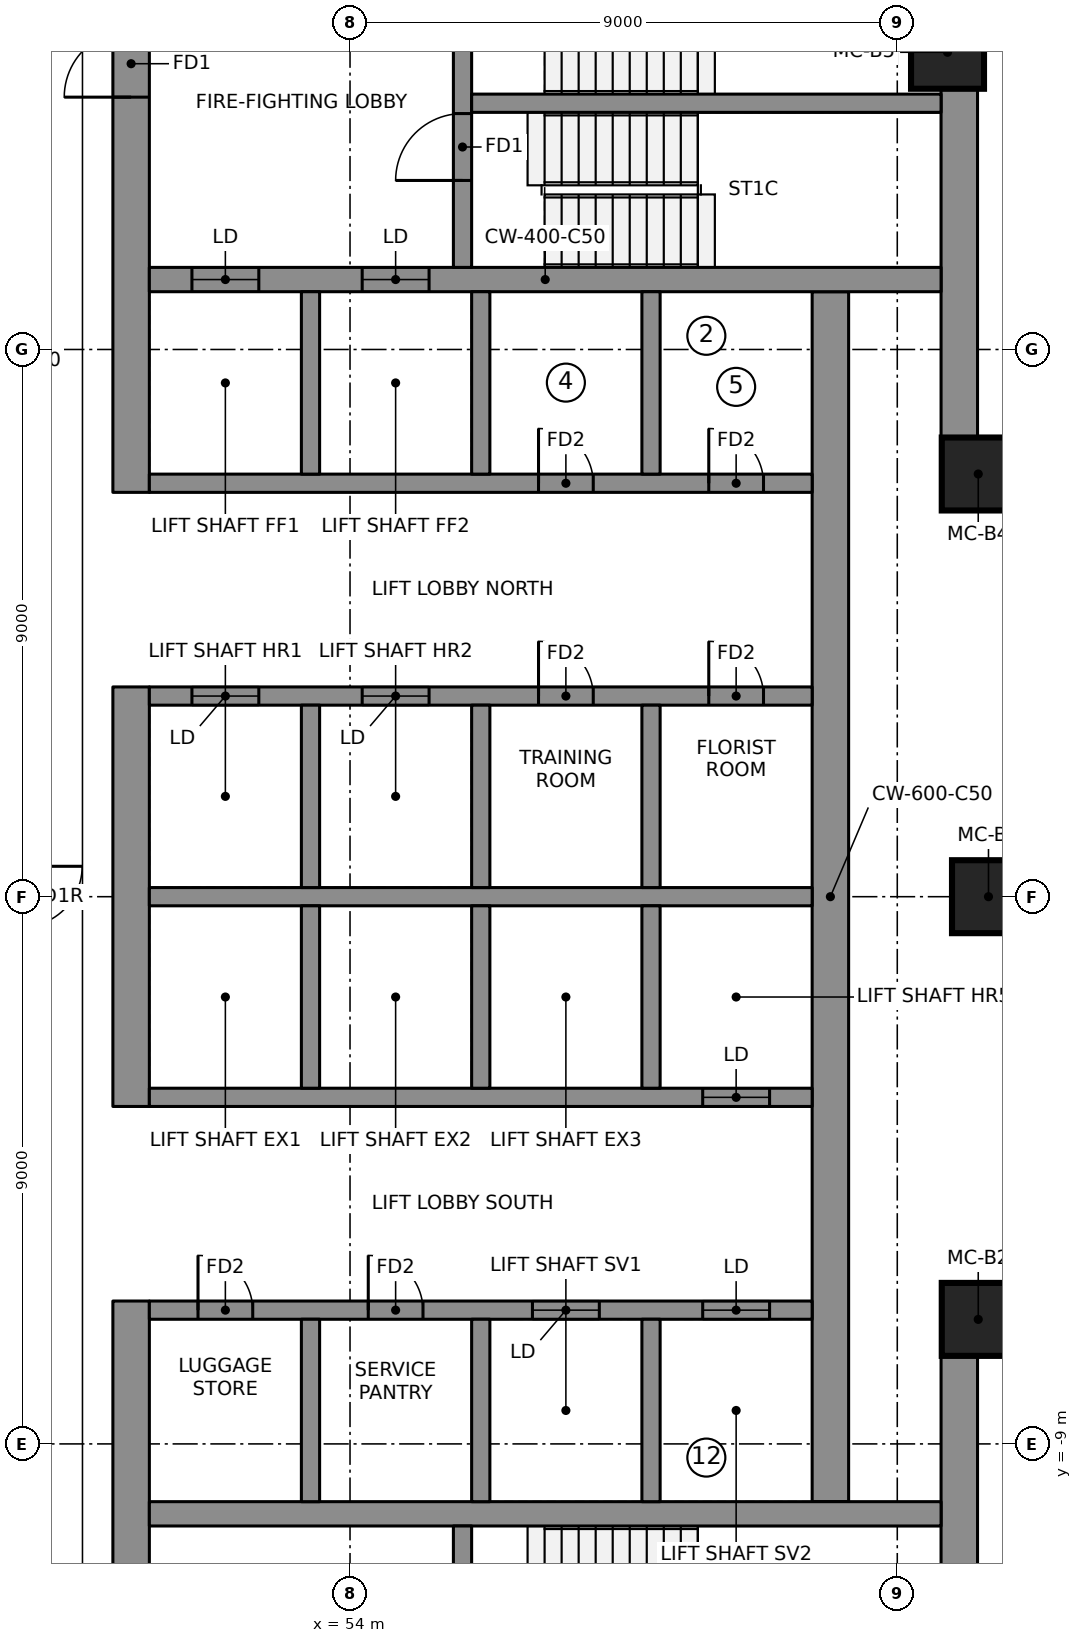
"""IFC4 building model, lengths in metres.
Left out: names, types, materials, properties, quantities, classifications, styles, units other than length and angle.
Written with IfcOpenShell. Run it as: python <this file> out.ifc"""

import sys

from ifc_helpers import new_model, si_unit, direction, frame, frame_2d, origin, origin_2d, place, context, subcontext, project, spatial, rectangle, extrude, element, fill, save


model = new_model("IFC4")
c1 = context("Model", 3, precision=1e-05, world=origin(), true_north=direction((0.0, 1.0)))
c2 = subcontext(c1, "Body", "Model", "MODEL_VIEW")
j1 = project(units=[si_unit("LENGTHUNIT", "METRE"), si_unit("PLANEANGLEUNIT", "RADIAN")], contexts=[c1])
p1 = place(None, origin())
s1 = spatial("IfcSite", under=j1, at=p1, CompositionType="ELEMENT")
p2 = place(p1, origin())
s2 = spatial("IfcBuilding", under=s1, at=p2, CompositionType="ELEMENT")
p3 = place(p2, frame((0.0, 0.0, 238.55)))
s3 = spatial("IfcBuildingStorey", under=s2, at=p3, CompositionType="ELEMENT", Elevation=238.55)
p4 = place(p3, frame((50.4, 6.65, 0.0), z_axis=(0.0, 0.0, 1.0), x_axis=(0.0, 1.0, 0.0)))
e1 = element("IfcWall", 1, at=p4, inside=s3, PredefinedType="SHEAR", context=c2, shape_type="SweptSolid", body=[
    extrude(rectangle(XDim=9.7, YDim=0.6, at=frame_2d((4.85, 0.0))), origin(), (0.0, 0.0, 1.0), 3.55),
])
p5 = place(p4, frame((6.5, 0.0, 0.0)))
e2 = element("IfcOpeningElement", 2, at=p5, cuts=e1, PredefinedType="OPENING", context=c2, shape_type="SweptSolid", body=[
    extrude(rectangle(XDim=1.1, YDim=2.1, at=frame_2d((0.55, 1.05))), frame((0.0, 0.31, 0.0), z_axis=(0.0, -1.0, 0.0), x_axis=(1.0, 0.0, 0.0)), (0.0, 0.0, 1.0), 0.62),
])
p6 = place(p3, frame((50.4, -3.45, 0.0), z_axis=(0.0, 0.0, 1.0), x_axis=(0.0, 1.0, 0.0)))
e3 = element("IfcWall", 3, at=p6, inside=s3, PredefinedType="SHEAR", context=c2, shape_type="SweptSolid", body=[
    extrude(rectangle(XDim=6.9, YDim=0.6, at=frame_2d((3.45, 0.0))), origin(), (0.0, 0.0, 1.0), 3.55),
])
p7 = place(p3, frame((50.4, -16.35, 0.0), z_axis=(0.0, 0.0, 1.0), x_axis=(0.0, 1.0, 0.0)))
e4 = element("IfcWall", 4, at=p7, inside=s3, PredefinedType="SHEAR", context=c2, shape_type="SweptSolid", body=[
    extrude(rectangle(XDim=9.7, YDim=0.6, at=frame_2d((4.85, 0.0))), origin(), (0.0, 0.0, 1.0), 3.55),
])
p8 = place(p7, frame((2.1, 0.0, 0.0)))
e5 = element("IfcOpeningElement", 5, at=p8, cuts=e4, PredefinedType="OPENING", context=c2, shape_type="SweptSolid", body=[
    extrude(rectangle(XDim=1.1, YDim=2.1, at=frame_2d((0.55, 1.05))), frame((0.0, 0.31, 0.0), z_axis=(0.0, -1.0, 0.0), x_axis=(1.0, 0.0, 0.0)), (0.0, 0.0, 1.0), 0.62),
])
for number, where, z_axis, x_axis in (
    (6, (64.02, 7.502, 0.0), (0.0, 0.0, 1.0), (0.0, 1.0, 0.0)),
    (7, (64.02, -15.75, 0.0), (0.0, 0.0, 1.0), (0.0, 1.0, 0.0)),
):
    element("IfcWall", number, at=place(p3, frame(where, z_axis=z_axis, x_axis=x_axis)), inside=s3, PredefinedType="SHEAR", context=c2, shape_type="SweptSolid", body=[
        extrude(rectangle(XDim=8.248, YDim=0.6, at=frame_2d((4.124, 0.0))), origin(), (0.0, 0.0, 1.0), 3.55),
    ])
p9 = place(p3, frame((61.9, -9.95, 0.0), z_axis=(0.0, 0.0, 1.0), x_axis=(0.0, 1.0, 0.0)))
e8 = element("IfcWall", 8, at=p9, inside=s3, PredefinedType="SHEAR", context=c2, shape_type="SweptSolid", body=[
    extrude(rectangle(XDim=19.9, YDim=0.6, at=frame_2d((9.95, 0.0))), origin(), (0.0, 0.0, 1.0), 3.55),
])
p10 = place(p3, frame((50.7, 10.15, 0.0), z_axis=(0.0, 0.0, 1.0), x_axis=(1.0, 0.0, 0.0)))
e9 = element("IfcWall", 9, at=p10, inside=s3, PredefinedType="SHEAR", context=c2, shape_type="SweptSolid", body=[
    extrude(rectangle(XDim=13.02, YDim=0.4, at=frame_2d((6.51, 0.0))), origin(), (0.0, 0.0, 1.0), 3.55),
])
p11 = place(p10, frame((0.7, 0.0, 0.0)))
e10 = element("IfcOpeningElement", 10, at=p11, cuts=e9, PredefinedType="OPENING", context=c2, shape_type="SweptSolid", body=[
    extrude(rectangle(XDim=1.1, YDim=2.1, at=frame_2d((0.55, 1.05))), frame((0.0, 0.21, 0.0), z_axis=(0.0, -1.0, 0.0), x_axis=(1.0, 0.0, 0.0)), (0.0, 0.0, 1.0), 0.42),
])
p12 = place(p10, frame((3.5, 0.0, 0.0)))
e11 = element("IfcOpeningElement", 11, at=p12, cuts=e9, PredefinedType="OPENING", context=c2, shape_type="SweptSolid", body=[
    extrude(rectangle(XDim=1.1, YDim=2.1, at=frame_2d((0.55, 1.05))), frame((0.0, 0.21, 0.0), z_axis=(0.0, -1.0, 0.0), x_axis=(1.0, 0.0, 0.0)), (0.0, 0.0, 1.0), 0.42),
])
p13 = place(p3, frame((50.7, -10.15, 0.0), z_axis=(0.0, 0.0, 1.0), x_axis=(1.0, 0.0, 0.0)))
e12 = element("IfcWall", 12, at=p13, inside=s3, PredefinedType="SHEAR", context=c2, shape_type="SweptSolid", body=[
    extrude(rectangle(XDim=13.02, YDim=0.4, at=frame_2d((6.51, 0.0))), origin(), (0.0, 0.0, 1.0), 3.55),
])
p14 = place(p3, frame((50.7, 0.0, 0.0), z_axis=(0.0, 0.0, 1.0), x_axis=(1.0, 0.0, 0.0)))
e13 = element("IfcWall", 13, at=p14, inside=s3, PredefinedType="SHEAR", context=c2, shape_type="SweptSolid", body=[
    extrude(rectangle(XDim=10.9, YDim=0.3, at=frame_2d((5.45, 0.0))), origin(), (0.0, 0.0, 1.0), 3.55),
])
p15 = place(p3, frame((50.7, 3.3, 0.0), z_axis=(0.0, 0.0, 1.0), x_axis=(1.0, 0.0, 0.0)))
e14 = element("IfcWall", 14, at=p15, inside=s3, PredefinedType="SHEAR", context=c2, shape_type="SweptSolid", body=[
    extrude(rectangle(XDim=10.9, YDim=0.3, at=frame_2d((5.45, 0.0))), origin(), (0.0, 0.0, 1.0), 3.55),
])
p16 = place(p15, frame((0.7, 0.0, 0.0)))
e15 = element("IfcOpeningElement", 15, at=p16, cuts=e14, PredefinedType="OPENING", context=c2, shape_type="SweptSolid", body=[
    extrude(rectangle(XDim=1.1, YDim=2.1, at=frame_2d((0.55, 1.05))), frame((0.0, 0.16, 0.0), z_axis=(0.0, -1.0, 0.0), x_axis=(1.0, 0.0, 0.0)), (0.0, 0.0, 1.0), 0.32),
])
p17 = place(p15, frame((3.5, 0.0, 0.0)))
e16 = element("IfcOpeningElement", 16, at=p17, cuts=e14, PredefinedType="OPENING", context=c2, shape_type="SweptSolid", body=[
    extrude(rectangle(XDim=1.1, YDim=2.1, at=frame_2d((0.55, 1.05))), frame((0.0, 0.16, 0.0), z_axis=(0.0, -1.0, 0.0), x_axis=(1.0, 0.0, 0.0)), (0.0, 0.0, 1.0), 0.32),
])
p18 = place(p15, frame((6.4, 0.0, 0.0)))
e17 = element("IfcOpeningElement", 17, at=p18, cuts=e14, PredefinedType="OPENING", context=c2, shape_type="SweptSolid", body=[
    extrude(rectangle(XDim=0.9, YDim=2.1, at=frame_2d((0.45, 1.05))), frame((0.0, 0.16, 0.0), z_axis=(0.0, -1.0, 0.0), x_axis=(1.0, 0.0, 0.0)), (0.0, 0.0, 1.0), 0.32),
])
p19 = place(p15, frame((9.2, 0.0, 0.0)))
e18 = element("IfcOpeningElement", 18, at=p19, cuts=e14, PredefinedType="OPENING", context=c2, shape_type="SweptSolid", body=[
    extrude(rectangle(XDim=0.9, YDim=2.1, at=frame_2d((0.45, 1.05))), frame((0.0, 0.16, 0.0), z_axis=(0.0, -1.0, 0.0), x_axis=(1.0, 0.0, 0.0)), (0.0, 0.0, 1.0), 0.32),
])
p20 = place(p3, frame((50.7, 6.8, 0.0), z_axis=(0.0, 0.0, 1.0), x_axis=(1.0, 0.0, 0.0)))
e19 = element("IfcWall", 19, at=p20, inside=s3, PredefinedType="SHEAR", context=c2, shape_type="SweptSolid", body=[
    extrude(rectangle(XDim=10.9, YDim=0.3, at=frame_2d((5.45, 0.0))), origin(), (0.0, 0.0, 1.0), 3.55),
])
p21 = place(p20, frame((6.4, 0.0, 0.0)))
e20 = element("IfcOpeningElement", 20, at=p21, cuts=e19, PredefinedType="OPENING", context=c2, shape_type="SweptSolid", body=[
    extrude(rectangle(XDim=0.9, YDim=2.1, at=frame_2d((0.45, 1.05))), frame((0.0, 0.16, 0.0), z_axis=(0.0, -1.0, 0.0), x_axis=(1.0, 0.0, 0.0)), (0.0, 0.0, 1.0), 0.32),
])
p22 = place(p20, frame((9.2, 0.0, 0.0)))
e21 = element("IfcOpeningElement", 21, at=p22, cuts=e19, PredefinedType="OPENING", context=c2, shape_type="SweptSolid", body=[
    extrude(rectangle(XDim=0.9, YDim=2.1, at=frame_2d((0.45, 1.05))), frame((0.0, 0.16, 0.0), z_axis=(0.0, -1.0, 0.0), x_axis=(1.0, 0.0, 0.0)), (0.0, 0.0, 1.0), 0.32),
])
for number, where, z_axis, x_axis in (
    (22, (53.35, 0.15, 0.0), (0.0, 0.0, 1.0), (0.0, 1.0, 0.0)),
    (23, (53.35, 6.95, 0.0), (0.0, 0.0, 1.0), (0.0, 1.0, 0.0)),
    (24, (56.15, 0.15, 0.0), (0.0, 0.0, 1.0), (0.0, 1.0, 0.0)),
    (25, (56.15, 6.95, 0.0), (0.0, 0.0, 1.0), (0.0, 1.0, 0.0)),
    (26, (58.95, 0.15, 0.0), (0.0, 0.0, 1.0), (0.0, 1.0, 0.0)),
    (27, (58.95, 6.95, 0.0), (0.0, 0.0, 1.0), (0.0, 1.0, 0.0)),
):
    element("IfcWall", number, at=place(p3, frame(where, z_axis=z_axis, x_axis=x_axis)), inside=s3, PredefinedType="SHEAR", context=c2, shape_type="SweptSolid", body=[
        extrude(rectangle(XDim=3.0, YDim=0.3, at=frame_2d((1.5, 0.0))), origin(), (0.0, 0.0, 1.0), 3.55),
    ])
p23 = place(p3, frame((50.7, -3.3, 0.0), z_axis=(0.0, 0.0, 1.0), x_axis=(1.0, 0.0, 0.0)))
e28 = element("IfcWall", 28, at=p23, inside=s3, PredefinedType="SHEAR", context=c2, shape_type="SweptSolid", body=[
    extrude(rectangle(XDim=10.9, YDim=0.3, at=frame_2d((5.45, 0.0))), origin(), (0.0, 0.0, 1.0), 3.55),
])
p24 = place(p23, frame((9.1, 0.0, 0.0)))
e29 = element("IfcOpeningElement", 29, at=p24, cuts=e28, PredefinedType="OPENING", context=c2, shape_type="SweptSolid", body=[
    extrude(rectangle(XDim=1.1, YDim=2.1, at=frame_2d((0.55, 1.05))), frame((0.0, 0.16, 0.0), z_axis=(0.0, -1.0, 0.0), x_axis=(1.0, 0.0, 0.0)), (0.0, 0.0, 1.0), 0.32),
])
p25 = place(p3, frame((50.7, -6.8, 0.0), z_axis=(0.0, 0.0, 1.0), x_axis=(1.0, 0.0, 0.0)))
e30 = element("IfcWall", 30, at=p25, inside=s3, PredefinedType="SHEAR", context=c2, shape_type="SweptSolid", body=[
    extrude(rectangle(XDim=10.9, YDim=0.3, at=frame_2d((5.45, 0.0))), origin(), (0.0, 0.0, 1.0), 3.55),
])
p26 = place(p25, frame((6.3, 0.0, 0.0)))
e31 = element("IfcOpeningElement", 31, at=p26, cuts=e30, PredefinedType="OPENING", context=c2, shape_type="SweptSolid", body=[
    extrude(rectangle(XDim=1.1, YDim=2.1, at=frame_2d((0.55, 1.05))), frame((0.0, 0.16, 0.0), z_axis=(0.0, -1.0, 0.0), x_axis=(1.0, 0.0, 0.0)), (0.0, 0.0, 1.0), 0.32),
])
p27 = place(p25, frame((9.1, 0.0, 0.0)))
e32 = element("IfcOpeningElement", 32, at=p27, cuts=e30, PredefinedType="OPENING", context=c2, shape_type="SweptSolid", body=[
    extrude(rectangle(XDim=1.1, YDim=2.1, at=frame_2d((0.55, 1.05))), frame((0.0, 0.16, 0.0), z_axis=(0.0, -1.0, 0.0), x_axis=(1.0, 0.0, 0.0)), (0.0, 0.0, 1.0), 0.32),
])
p28 = place(p25, frame((0.8, 0.0, 0.0)))
e33 = element("IfcOpeningElement", 33, at=p28, cuts=e30, PredefinedType="OPENING", context=c2, shape_type="SweptSolid", body=[
    extrude(rectangle(XDim=0.9, YDim=2.1, at=frame_2d((0.45, 1.05))), frame((0.0, 0.16, 0.0), z_axis=(0.0, -1.0, 0.0), x_axis=(1.0, 0.0, 0.0)), (0.0, 0.0, 1.0), 0.32),
])
p29 = place(p25, frame((3.6, 0.0, 0.0)))
e34 = element("IfcOpeningElement", 34, at=p29, cuts=e30, PredefinedType="OPENING", context=c2, shape_type="SweptSolid", body=[
    extrude(rectangle(XDim=0.9, YDim=2.1, at=frame_2d((0.45, 1.05))), frame((0.0, 0.16, 0.0), z_axis=(0.0, -1.0, 0.0), x_axis=(1.0, 0.0, 0.0)), (0.0, 0.0, 1.0), 0.32),
])
for number, where, z_axis, x_axis in (
    (35, (53.35, -3.15, 0.0), (0.0, 0.0, 1.0), (0.0, 1.0, 0.0)),
    (36, (53.35, -9.95, 0.0), (0.0, 0.0, 1.0), (0.0, 1.0, 0.0)),
    (37, (56.15, -3.15, 0.0), (0.0, 0.0, 1.0), (0.0, 1.0, 0.0)),
    (38, (56.15, -9.95, 0.0), (0.0, 0.0, 1.0), (0.0, 1.0, 0.0)),
    (39, (58.95, -3.15, 0.0), (0.0, 0.0, 1.0), (0.0, 1.0, 0.0)),
    (40, (58.95, -9.95, 0.0), (0.0, 0.0, 1.0), (0.0, 1.0, 0.0)),
):
    element("IfcWall", number, at=place(p3, frame(where, z_axis=z_axis, x_axis=x_axis)), inside=s3, PredefinedType="SHEAR", context=c2, shape_type="SweptSolid", body=[
        extrude(rectangle(XDim=3.0, YDim=0.3, at=frame_2d((1.5, 0.0))), origin(), (0.0, 0.0, 1.0), 3.55),
    ])
p30 = place(p3, frame((55.85, 10.35, 0.0), z_axis=(0.0, 0.0, 1.0), x_axis=(0.0, 1.0, 0.0)))
e41 = element("IfcWall", 41, at=p30, inside=s3, PredefinedType="SHEAR", context=c2, shape_type="SweptSolid", body=[
    extrude(rectangle(XDim=5.4, YDim=0.3, at=frame_2d((2.7, 0.0))), origin(), (0.0, 0.0, 1.0), 3.55),
])
p31 = place(p30, frame((1.43, 0.0, 0.0)))
e42 = element("IfcOpeningElement", 42, at=p31, cuts=e41, PredefinedType="OPENING", context=c2, shape_type="SweptSolid", body=[
    extrude(rectangle(XDim=1.1, YDim=2.1, at=frame_2d((0.55, 1.05))), frame((0.0, 0.16, 0.0), z_axis=(0.0, -1.0, 0.0), x_axis=(1.0, 0.0, 0.0)), (0.0, 0.0, 1.0), 0.32),
])
p32 = place(p30, frame((3.6, 0.0, 0.0)))
e43 = element("IfcOpeningElement", 43, at=p32, cuts=e41, PredefinedType="OPENING", context=c2, shape_type="SweptSolid", body=[
    extrude(rectangle(XDim=1.1, YDim=2.1, at=frame_2d((0.55, 1.05))), frame((0.0, 0.16, 0.0), z_axis=(0.0, -1.0, 0.0), x_axis=(1.0, 0.0, 0.0)), (0.0, 0.0, 1.0), 0.32),
])
p33 = place(p3, frame((55.85, -15.75, 0.0), z_axis=(0.0, 0.0, 1.0), x_axis=(0.0, 1.0, 0.0)))
e44 = element("IfcWall", 44, at=p33, inside=s3, PredefinedType="SHEAR", context=c2, shape_type="SweptSolid", body=[
    extrude(rectangle(XDim=5.4, YDim=0.3, at=frame_2d((2.7, 0.0))), origin(), (0.0, 0.0, 1.0), 3.55),
])
p34 = place(p33, frame((3.6, 0.0, 0.0)))
e45 = element("IfcOpeningElement", 45, at=p34, cuts=e44, PredefinedType="OPENING", context=c2, shape_type="SweptSolid", body=[
    extrude(rectangle(XDim=1.1, YDim=2.1, at=frame_2d((0.55, 1.05))), frame((0.0, 0.16, 0.0), z_axis=(0.0, -1.0, 0.0), x_axis=(1.0, 0.0, 0.0)), (0.0, 0.0, 1.0), 0.32),
])
p35 = place(p33, frame((0.8, 0.0, 0.0)))
e46 = element("IfcOpeningElement", 46, at=p35, cuts=e44, PredefinedType="OPENING", context=c2, shape_type="SweptSolid", body=[
    extrude(rectangle(XDim=0.9, YDim=2.1, at=frame_2d((0.45, 1.05))), frame((0.0, 0.16, 0.0), z_axis=(0.0, -1.0, 0.0), x_axis=(1.0, 0.0, 0.0)), (0.0, 0.0, 1.0), 0.32),
])
p36 = place(p3, frame((56.0, 13.05, 0.0), z_axis=(0.0, 0.0, 1.0), x_axis=(1.0, 0.0, 0.0)))
e47 = element("IfcWall", 47, at=p36, inside=s3, PredefinedType="SHEAR", context=c2, shape_type="SweptSolid", body=[
    extrude(rectangle(XDim=7.72, YDim=0.3, at=frame_2d((3.86, 0.0))), origin(), (0.0, 0.0, 1.0), 3.55),
])
for number, where, z_axis, x_axis in (
    (48, (64.332, -6.952, 0.0), (0.0, 0.0, 1.0), (1.0, 0.0, 0.0)),
    (49, (64.5, 0.0, 0.0), (0.0, 0.0, 1.0), (1.0, 0.0, 0.0)),
    (50, (64.332, 6.952, 0.0), (0.0, 0.0, 1.0), (1.0, 0.0, 0.0)),
    (51, (63.826, 13.888, 0.0), (0.0, 0.0, 1.0), (1.0, 0.0, 0.0)),
):
    element("IfcColumn", number, at=place(p3, frame(where, z_axis=z_axis, x_axis=x_axis)), inside=s3, PredefinedType="COLUMN", context=c2, shape_type="SweptSolid", body=[
        extrude(rectangle(XDim=1.2, YDim=1.2, at=origin_2d()), origin(), (0.0, 0.0, 1.0), 3.55),
    ])
p37 = place(p11, origin())
e52 = element("IfcDoor", 52, at=p37, inside=s3, OperationType="DOUBLE_DOOR_SLIDING", PredefinedType="DOOR", context=c2, shape_type="SweptSolid", body=[
    extrude(rectangle(XDim=1.1, YDim=2.1, at=frame_2d((0.55, 1.05))), frame((0.0, 0.025, 0.0), z_axis=(0.0, -1.0, 0.0), x_axis=(1.0, 0.0, 0.0)), (0.0, 0.0, 1.0), 0.05),
])
fill(e10, e52)
p38 = place(p12, origin())
e53 = element("IfcDoor", 53, at=p38, inside=s3, OperationType="DOUBLE_DOOR_SLIDING", PredefinedType="DOOR", context=c2, shape_type="SweptSolid", body=[
    extrude(rectangle(XDim=1.1, YDim=2.1, at=frame_2d((0.55, 1.05))), frame((0.0, 0.025, 0.0), z_axis=(0.0, -1.0, 0.0), x_axis=(1.0, 0.0, 0.0)), (0.0, 0.0, 1.0), 0.05),
])
fill(e11, e53)
p39 = place(p16, origin())
e54 = element("IfcDoor", 54, at=p39, inside=s3, OperationType="DOUBLE_DOOR_SLIDING", PredefinedType="DOOR", context=c2, shape_type="SweptSolid", body=[
    extrude(rectangle(XDim=1.1, YDim=2.1, at=frame_2d((0.55, 1.05))), frame((0.0, 0.025, 0.0), z_axis=(0.0, -1.0, 0.0), x_axis=(1.0, 0.0, 0.0)), (0.0, 0.0, 1.0), 0.05),
])
fill(e15, e54)
p40 = place(p17, origin())
e55 = element("IfcDoor", 55, at=p40, inside=s3, OperationType="DOUBLE_DOOR_SLIDING", PredefinedType="DOOR", context=c2, shape_type="SweptSolid", body=[
    extrude(rectangle(XDim=1.1, YDim=2.1, at=frame_2d((0.55, 1.05))), frame((0.0, 0.025, 0.0), z_axis=(0.0, -1.0, 0.0), x_axis=(1.0, 0.0, 0.0)), (0.0, 0.0, 1.0), 0.05),
])
fill(e16, e55)
p41 = place(p24, origin())
e56 = element("IfcDoor", 56, at=p41, inside=s3, OperationType="DOUBLE_DOOR_SLIDING", PredefinedType="DOOR", context=c2, shape_type="SweptSolid", body=[
    extrude(rectangle(XDim=1.1, YDim=2.1, at=frame_2d((0.55, 1.05))), frame((0.0, 0.025, 0.0), z_axis=(0.0, -1.0, 0.0), x_axis=(1.0, 0.0, 0.0)), (0.0, 0.0, 1.0), 0.05),
])
fill(e29, e56)
p42 = place(p26, origin())
e57 = element("IfcDoor", 57, at=p42, inside=s3, OperationType="DOUBLE_DOOR_SLIDING", PredefinedType="DOOR", context=c2, shape_type="SweptSolid", body=[
    extrude(rectangle(XDim=1.1, YDim=2.1, at=frame_2d((0.55, 1.05))), frame((0.0, 0.025, 0.0), z_axis=(0.0, -1.0, 0.0), x_axis=(1.0, 0.0, 0.0)), (0.0, 0.0, 1.0), 0.05),
])
fill(e31, e57)
p43 = place(p27, origin())
e58 = element("IfcDoor", 58, at=p43, inside=s3, OperationType="DOUBLE_DOOR_SLIDING", PredefinedType="DOOR", context=c2, shape_type="SweptSolid", body=[
    extrude(rectangle(XDim=1.1, YDim=2.1, at=frame_2d((0.55, 1.05))), frame((0.0, 0.025, 0.0), z_axis=(0.0, -1.0, 0.0), x_axis=(1.0, 0.0, 0.0)), (0.0, 0.0, 1.0), 0.05),
])
fill(e32, e58)
p44 = place(p31, origin())
e59 = element("IfcDoor", 59, at=p44, inside=s3, OperationType="SINGLE_SWING_RIGHT", PredefinedType="DOOR", context=c2, shape_type="SweptSolid", body=[
    extrude(rectangle(XDim=1.1, YDim=2.1, at=frame_2d((0.55, 1.05))), frame((0.0, 0.025, 0.0), z_axis=(0.0, -1.0, 0.0), x_axis=(1.0, 0.0, 0.0)), (0.0, 0.0, 1.0), 0.05),
])
fill(e42, e59)
p45 = place(p5, origin())
e60 = element("IfcDoor", 60, at=p45, inside=s3, OperationType="SINGLE_SWING_RIGHT", PredefinedType="DOOR", context=c2, shape_type="SweptSolid", body=[
    extrude(rectangle(XDim=1.1, YDim=2.1, at=frame_2d((0.55, 1.05))), frame((0.0, 0.025, 0.0), z_axis=(0.0, -1.0, 0.0), x_axis=(1.0, 0.0, 0.0)), (0.0, 0.0, 1.0), 0.05),
])
fill(e2, e60)
p46 = place(p21, origin())
e61 = element("IfcDoor", 61, at=p46, inside=s3, OperationType="SINGLE_SWING_LEFT", PredefinedType="DOOR", context=c2, shape_type="SweptSolid", body=[
    extrude(rectangle(XDim=0.9, YDim=2.1, at=frame_2d((0.45, 1.05))), frame((0.0, 0.025, 0.0), z_axis=(0.0, -1.0, 0.0), x_axis=(1.0, 0.0, 0.0)), (0.0, 0.0, 1.0), 0.05),
])
fill(e20, e61)
p47 = place(p22, origin())
e62 = element("IfcDoor", 62, at=p47, inside=s3, OperationType="SINGLE_SWING_LEFT", PredefinedType="DOOR", context=c2, shape_type="SweptSolid", body=[
    extrude(rectangle(XDim=0.9, YDim=2.1, at=frame_2d((0.45, 1.05))), frame((0.0, 0.025, 0.0), z_axis=(0.0, -1.0, 0.0), x_axis=(1.0, 0.0, 0.0)), (0.0, 0.0, 1.0), 0.05),
])
fill(e21, e62)
p48 = place(p18, origin())
e63 = element("IfcDoor", 63, at=p48, inside=s3, OperationType="SINGLE_SWING_LEFT", PredefinedType="DOOR", context=c2, shape_type="SweptSolid", body=[
    extrude(rectangle(XDim=0.9, YDim=2.1, at=frame_2d((0.45, 1.05))), frame((0.0, 0.025, 0.0), z_axis=(0.0, -1.0, 0.0), x_axis=(1.0, 0.0, 0.0)), (0.0, 0.0, 1.0), 0.05),
])
fill(e17, e63)
p49 = place(p19, origin())
e64 = element("IfcDoor", 64, at=p49, inside=s3, OperationType="SINGLE_SWING_LEFT", PredefinedType="DOOR", context=c2, shape_type="SweptSolid", body=[
    extrude(rectangle(XDim=0.9, YDim=2.1, at=frame_2d((0.45, 1.05))), frame((0.0, 0.025, 0.0), z_axis=(0.0, -1.0, 0.0), x_axis=(1.0, 0.0, 0.0)), (0.0, 0.0, 1.0), 0.05),
])
fill(e18, e64)
p50 = place(p28, origin())
e65 = element("IfcDoor", 65, at=p50, inside=s3, OperationType="SINGLE_SWING_LEFT", PredefinedType="DOOR", context=c2, shape_type="SweptSolid", body=[
    extrude(rectangle(XDim=0.9, YDim=2.1, at=frame_2d((0.45, 1.05))), frame((0.0, 0.025, 0.0), z_axis=(0.0, -1.0, 0.0), x_axis=(1.0, 0.0, 0.0)), (0.0, 0.0, 1.0), 0.05),
])
fill(e33, e65)
p51 = place(p29, origin())
e66 = element("IfcDoor", 66, at=p51, inside=s3, OperationType="SINGLE_SWING_LEFT", PredefinedType="DOOR", context=c2, shape_type="SweptSolid", body=[
    extrude(rectangle(XDim=0.9, YDim=2.1, at=frame_2d((0.45, 1.05))), frame((0.0, 0.025, 0.0), z_axis=(0.0, -1.0, 0.0), x_axis=(1.0, 0.0, 0.0)), (0.0, 0.0, 1.0), 0.05),
])
fill(e34, e66)
save(model, sys.argv[1])
